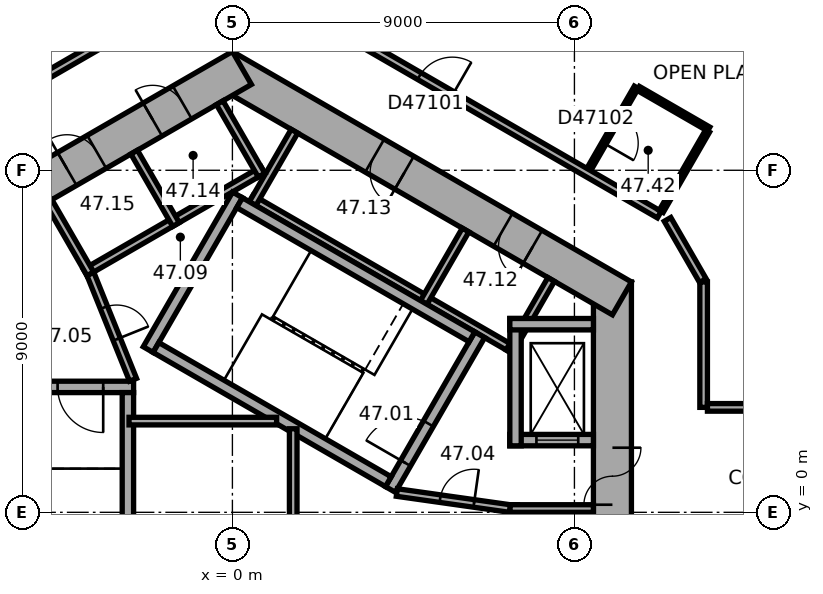
"""IFC4 building model, lengths in metres.
Left out: names, types, materials, properties, quantities, classifications, styles, units other than length and angle.
Written with IfcOpenShell. Run it as: python <this file> out.ifc"""

import sys

from ifc_helpers import new_model, si_unit, direction, frame, frame_2d, origin, place, context, subcontext, project, spatial, rectangle, extrude, element, fill, save


model = new_model("IFC4")
c1 = context("Model", 3, precision=1e-05, world=origin(), true_north=direction((0.0, 1.0)))
c2 = subcontext(c1, "Body", "Model", "MODEL_VIEW")
j1 = project(units=[si_unit("LENGTHUNIT", "METRE"), si_unit("PLANEANGLEUNIT", "RADIAN")], contexts=[c1])
p1 = place(None, origin())
s1 = spatial("IfcSite", under=j1, at=p1, CompositionType="ELEMENT")
p2 = place(p1, origin())
s2 = spatial("IfcBuilding", under=s1, at=p2, CompositionType="ELEMENT")
p3 = place(p2, frame((0.0, 0.0, 191.0)))
s3 = spatial("IfcBuildingStorey", under=s2, at=p3, CompositionType="ELEMENT", Elevation=191.0)
p4 = place(p3, frame((10.0, -6.062, 0.0), z_axis=(0.0, 0.0, 1.0), x_axis=(0.0, 1.0, 0.0)))
e1 = element("IfcWall", 1, at=p4, inside=s3, PredefinedType="SHEAR", context=c2, shape_type="SweptSolid", body=[
    extrude(rectangle(XDim=12.125, YDim=1.0, at=frame_2d((6.062, 0.0))), origin(), (0.0, 0.0, 1.0), 3.7),
])
p5 = place(p4, frame((6.262, 0.0, 0.0)))
e2 = element("IfcOpeningElement", 2, at=p5, cuts=e1, PredefinedType="OPENING", context=c2, shape_type="SweptSolid", body=[
    extrude(rectangle(XDim=1.5, YDim=2.1, at=frame_2d((0.75, 1.05))), frame((0.0, 0.51, 0.0), z_axis=(0.0, -1.0, 0.0), x_axis=(1.0, 0.0, 0.0)), (0.0, 0.0, 1.0), 1.02),
])
p6 = place(p4, frame((1.812, 0.0, 0.0)))
e3 = element("IfcOpeningElement", 3, at=p6, cuts=e1, PredefinedType="OPENING", context=c2, shape_type="SweptSolid", body=[
    extrude(rectangle(XDim=0.9, YDim=2.1, at=frame_2d((0.45, 1.05))), frame((0.0, 0.51, 0.0), z_axis=(0.0, -1.0, 0.0), x_axis=(1.0, 0.0, 0.0)), (0.0, 0.0, 1.0), 1.02),
])
p7 = place(p4, frame((4.412, 0.0, 0.0)))
e4 = element("IfcOpeningElement", 4, at=p7, cuts=e1, PredefinedType="OPENING", context=c2, shape_type="SweptSolid", body=[
    extrude(rectangle(XDim=0.9, YDim=2.1, at=frame_2d((0.45, 1.05))), frame((0.0, 0.51, 0.0), z_axis=(0.0, -1.0, 0.0), x_axis=(1.0, 0.0, 0.0)), (0.0, 0.0, 1.0), 1.02),
])
p8 = place(p3, frame((10.25, 5.629, 0.0), z_axis=(0.0, 0.0, 1.0), x_axis=(-0.866022616891, 0.50000482701, 0.0)))
e5 = element("IfcWall", 5, at=p8, inside=s3, PredefinedType="SHEAR", context=c2, shape_type="SweptSolid", body=[
    extrude(rectangle(XDim=12.125, YDim=1.0, at=frame_2d((6.062, 0.0))), origin(), (0.0, 0.0, 1.0), 3.7),
])
p9 = place(p8, frame((2.712, 0.0, 0.0)))
e6 = element("IfcOpeningElement", 6, at=p9, cuts=e5, PredefinedType="OPENING", context=c2, shape_type="SweptSolid", body=[
    extrude(rectangle(XDim=0.9, YDim=2.1, at=frame_2d((0.45, 1.05))), frame((0.0, 0.51, 0.0), z_axis=(0.0, -1.0, 0.0), x_axis=(1.0, 0.0, 0.0)), (0.0, 0.0, 1.0), 1.02),
])
p10 = place(p8, frame((6.612, 0.0, 0.0)))
e7 = element("IfcOpeningElement", 7, at=p10, cuts=e5, PredefinedType="OPENING", context=c2, shape_type="SweptSolid", body=[
    extrude(rectangle(XDim=0.9, YDim=2.1, at=frame_2d((0.45, 1.05))), frame((0.0, 0.51, 0.0), z_axis=(0.0, -1.0, 0.0), x_axis=(1.0, 0.0, 0.0)), (0.0, 0.0, 1.0), 1.02),
])
p11 = place(p3, frame((0.25, 11.691, 0.0), z_axis=(0.0, 0.0, 1.0), x_axis=(-0.866022616891, -0.50000482701, 0.0)))
e8 = element("IfcWall", 8, at=p11, inside=s3, PredefinedType="SHEAR", context=c2, shape_type="SweptSolid", body=[
    extrude(rectangle(XDim=12.125, YDim=1.0, at=frame_2d((6.062, 0.0))), origin(), (0.0, 0.0, 1.0), 3.7),
])
p12 = place(p11, frame((6.262, 0.0, 0.0)))
e9 = element("IfcOpeningElement", 9, at=p12, cuts=e8, PredefinedType="OPENING", context=c2, shape_type="SweptSolid", body=[
    extrude(rectangle(XDim=1.5, YDim=2.1, at=frame_2d((0.75, 1.05))), frame((0.0, 0.51, 0.0), z_axis=(0.0, -1.0, 0.0), x_axis=(1.0, 0.0, 0.0)), (0.0, 0.0, 1.0), 1.02),
])
p13 = place(p11, frame((1.812, 0.0, 0.0)))
e10 = element("IfcOpeningElement", 10, at=p13, cuts=e8, PredefinedType="OPENING", context=c2, shape_type="SweptSolid", body=[
    extrude(rectangle(XDim=0.9, YDim=2.1, at=frame_2d((0.45, 1.05))), frame((0.0, 0.51, 0.0), z_axis=(0.0, -1.0, 0.0), x_axis=(1.0, 0.0, 0.0)), (0.0, 0.0, 1.0), 1.02),
])
p14 = place(p11, frame((4.412, 0.0, 0.0)))
e11 = element("IfcOpeningElement", 11, at=p14, cuts=e8, PredefinedType="OPENING", context=c2, shape_type="SweptSolid", body=[
    extrude(rectangle(XDim=0.9, YDim=2.1, at=frame_2d((0.45, 1.05))), frame((0.0, 0.51, 0.0), z_axis=(0.0, -1.0, 0.0), x_axis=(1.0, 0.0, 0.0)), (0.0, 0.0, 1.0), 1.02),
])
p15 = place(p3, frame((7.4, -5.2, 0.0), z_axis=(0.0, 0.0, 1.0), x_axis=(0.0, 1.0, 0.0)))
e12 = element("IfcWall", 12, at=p15, inside=s3, PredefinedType="PARTITIONING", context=c2, shape_type="SweptSolid", body=[
    extrude(rectangle(XDim=5.4, YDim=0.2, at=frame_2d((2.7, 0.0))), origin(), (0.0, 0.0, 1.0), 3.42),
])
p16 = place(p3, frame((7.3, 0.1, 0.0), z_axis=(0.0, 0.0, 1.0), x_axis=(1.0, 0.0, 0.0)))
e13 = element("IfcWall", 13, at=p16, inside=s3, PredefinedType="PARTITIONING", context=c2, shape_type="SweptSolid", body=[
    extrude(rectangle(XDim=2.2, YDim=0.2, at=frame_2d((1.1, 0.0))), origin(), (0.0, 0.0, 1.0), 3.42),
])
p17 = place(p3, frame((7.424, 4.259, 0.0), z_axis=(0.0, 0.0, 1.0), x_axis=(-0.866026010844, 0.49999894854, 0.0)))
e14 = element("IfcWall", 14, at=p17, inside=s3, PredefinedType="PARTITIONING", context=c2, shape_type="SweptSolid", body=[
    extrude(rectangle(XDim=8.0, YDim=0.2, at=frame_2d((4.0, 0.0))), origin(), (0.0, 0.0, 1.0), 3.42),
])
for number, where, z_axis, x_axis in (
    (15, (7.287, 4.222, 0.0), (0.0, 0.0, 1.0), (0.5, 0.866, 0.0)),
    (16, (5.036, 5.522, 0.0), (0.0, 0.0, 1.0), (0.5, 0.866, 0.0)),
    (17, (0.532, 8.122, 0.0), (0.0, 0.0, 1.0), (0.5, 0.866, 0.0)),
):
    element("IfcWall", number, at=place(p3, frame(where, z_axis=z_axis, x_axis=x_axis)), inside=s3, PredefinedType="PARTITIONING", context=c2, shape_type="SweptSolid", body=[
        extrude(rectangle(XDim=2.2, YDim=0.2, at=frame_2d((1.1, 0.0))), origin(), (0.0, 0.0, 1.0), 3.42),
    ])
p18 = place(p3, frame((0.803, 9.009, 0.0), z_axis=(0.0, 0.0, 1.0), x_axis=(-0.866028230842, -0.499995103361, 0.0)))
e18 = element("IfcWall", 18, at=p18, inside=s3, PredefinedType="PARTITIONING", context=c2, shape_type="SweptSolid", body=[
    extrude(rectangle(XDim=5.4, YDim=0.2, at=frame_2d((2.7, 0.0))), origin(), (0.0, 0.0, 1.0), 3.42),
])
p19 = place(p3, frame((0.767, 8.872, 0.0), z_axis=(0.0, 0.0, 1.0), x_axis=(-0.499994660107, 0.866028486751, 0.0)))
e19 = element("IfcWall", 19, at=p19, inside=s3, PredefinedType="PARTITIONING", context=c2, shape_type="SweptSolid", body=[
    extrude(rectangle(XDim=2.2, YDim=0.2, at=frame_2d((1.1, 0.0))), origin(), (0.0, 0.0, 1.0), 3.42),
])
for number, where, z_axis, x_axis in (
    (20, (-1.485, 7.572, 0.0), (0.0, 0.0, 1.0), (-0.5, 0.866, 0.0)),
    (21, (-3.737, 6.272, 0.0), (0.0, 0.0, 1.0), (-0.5, 0.866, 0.0)),
):
    element("IfcWall", number, at=place(p3, frame(where, z_axis=z_axis, x_axis=x_axis)), inside=s3, PredefinedType="PARTITIONING", context=c2, shape_type="SweptSolid", body=[
        extrude(rectangle(XDim=2.2, YDim=0.2, at=frame_2d((1.1, 0.0))), origin(), (0.0, 0.0, 1.0), 3.42),
    ])
p20 = place(p3, frame((4.158, 0.602, 0.0), z_axis=(0.0, 0.0, 1.0), x_axis=(0.499977259774, 0.866038532462, 0.0)))
e22 = element("IfcWall", 22, at=p20, inside=s3, PredefinedType="SHEAR", context=c2, shape_type="SweptSolid", body=[
    extrude(rectangle(XDim=4.7, YDim=0.3, at=frame_2d((2.35, 0.0))), origin(), (0.0, 0.0, 1.0), 3.42),
])
p21 = place(p20, frame((0.8, 0.0, 0.0)))
e23 = element("IfcOpeningElement", 23, at=p21, cuts=e22, PredefinedType="OPENING", context=c2, shape_type="SweptSolid", body=[
    extrude(rectangle(XDim=1.2, YDim=2.1, at=frame_2d((0.6, 1.05))), frame((0.0, 0.16, 0.0), z_axis=(0.0, -1.0, 0.0), x_axis=(1.0, 0.0, 0.0)), (0.0, 0.0, 1.0), 0.32),
])
p22 = place(p3, frame((-2.216, 4.282, 0.0), z_axis=(0.0, 0.0, 1.0), x_axis=(0.499977259774, 0.866038532462, 0.0)))
e24 = element("IfcWall", 24, at=p22, inside=s3, PredefinedType="SHEAR", context=c2, shape_type="SweptSolid", body=[
    extrude(rectangle(XDim=4.7, YDim=0.3, at=frame_2d((2.35, 0.0))), origin(), (0.0, 0.0, 1.0), 3.42),
])
for number, where, z_axis, x_axis in (
    (25, (4.103, 0.807, 0.0), (0.0, 0.0, 1.0), (-0.866, 0.5, 0.0)),
    (26, (6.303, 4.617, 0.0), (0.0, 0.0, 1.0), (-0.866, 0.5, 0.0)),
):
    element("IfcWall", number, at=place(p3, frame(where, z_axis=z_axis, x_axis=x_axis)), inside=s3, PredefinedType="SHEAR", context=c2, shape_type="SweptSolid", body=[
        extrude(rectangle(XDim=7.06, YDim=0.3, at=frame_2d((3.53, 0.0))), origin(), (0.0, 0.0, 1.0), 3.42),
    ])
p23 = place(p3, frame((-2.6, 3.3, 0.0), z_axis=(0.0, 0.0, 1.0), x_axis=(-1.0, 0.0, 0.0)))
e27 = element("IfcWall", 27, at=p23, inside=s3, PredefinedType="SHEAR", context=c2, shape_type="SweptSolid", body=[
    extrude(rectangle(XDim=4.7, YDim=0.3, at=frame_2d((2.35, 0.0))), origin(), (0.0, 0.0, 1.0), 3.42),
])
p24 = place(p23, frame((0.8, 0.0, 0.0)))
e28 = element("IfcOpeningElement", 28, at=p24, cuts=e27, PredefinedType="OPENING", context=c2, shape_type="SweptSolid", body=[
    extrude(rectangle(XDim=1.2, YDim=2.1, at=frame_2d((0.6, 1.05))), frame((0.0, 0.16, 0.0), z_axis=(0.0, -1.0, 0.0), x_axis=(1.0, 0.0, 0.0)), (0.0, 0.0, 1.0), 0.32),
])
p25 = place(p3, frame((-2.75, 3.15, 0.0), z_axis=(0.0, 0.0, 1.0), x_axis=(0.0, -1.0, 0.0)))
e29 = element("IfcWall", 29, at=p25, inside=s3, PredefinedType="SHEAR", context=c2, shape_type="SweptSolid", body=[
    extrude(rectangle(XDim=7.06, YDim=0.3, at=frame_2d((3.53, 0.0))), origin(), (0.0, 0.0, 1.0), 3.42),
])
p26 = place(p3, frame((7.3, 1.9, 0.0), z_axis=(0.0, 0.0, 1.0), x_axis=(1.0, 0.0, 0.0)))
e30 = element("IfcWall", 30, at=p26, inside=s3, PredefinedType="SHEAR", context=c2, shape_type="SweptSolid", body=[
    extrude(rectangle(XDim=2.2, YDim=0.3, at=frame_2d((1.1, 0.0))), origin(), (0.0, 0.0, 1.0), 3.42),
])
p27 = place(p26, frame((0.7, 0.0, 0.0)))
e31 = element("IfcOpeningElement", 31, at=p27, cuts=e30, PredefinedType="OPENING", context=c2, shape_type="SweptSolid", body=[
    extrude(rectangle(XDim=1.1, YDim=2.1, at=frame_2d((0.55, 1.05))), frame((0.0, 0.16, 0.0), z_axis=(0.0, -1.0, 0.0), x_axis=(1.0, 0.0, 0.0)), (0.0, 0.0, 1.0), 0.32),
])
p28 = place(p3, frame((7.45, 1.75, 0.0), z_axis=(0.0, 0.0, 1.0), x_axis=(0.0, 1.0, 0.0)))
e32 = element("IfcWall", 32, at=p28, inside=s3, PredefinedType="SHEAR", context=c2, shape_type="SweptSolid", body=[
    extrude(rectangle(XDim=3.35, YDim=0.3, at=frame_2d((1.675, 0.0))), origin(), (0.0, 0.0, 1.0), 3.42),
])
p29 = place(p3, frame((7.3, 4.95, 0.0), z_axis=(0.0, 0.0, 1.0), x_axis=(1.0, 0.0, 0.0)))
e33 = element("IfcWall", 33, at=p29, inside=s3, PredefinedType="SHEAR", context=c2, shape_type="SweptSolid", body=[
    extrude(rectangle(XDim=2.2, YDim=0.3, at=frame_2d((1.1, 0.0))), origin(), (0.0, 0.0, 1.0), 3.42),
])
p30 = place(p3, frame((4.327, 0.521, 0.0), z_axis=(0.0, 0.0, 1.0), x_axis=(0.990124376366, -0.14019172346, 0.0)))
e34 = element("IfcWall", 34, at=p30, inside=s3, PredefinedType="PARTITIONING", context=c2, shape_type="SweptSolid", body=[
    extrude(rectangle(XDim=3.002, YDim=0.2, at=frame_2d((1.501, 0.0))), origin(), (0.0, 0.0, 1.0), 3.42),
])
p31 = place(p30, frame((1.15, 0.0, 0.0)))
e35 = element("IfcOpeningElement", 35, at=p31, cuts=e34, PredefinedType="OPENING", context=c2, shape_type="SweptSolid", body=[
    extrude(rectangle(XDim=0.9, YDim=2.1, at=frame_2d((0.45, 1.05))), frame((0.0, 0.11, 0.0), z_axis=(0.0, -1.0, 0.0), x_axis=(1.0, 0.0, 0.0)), (0.0, 0.0, 1.0), 0.22),
])
p32 = place(p3, frame((-2.615, 3.487, 0.0), z_axis=(0.0, 0.0, 1.0), x_axis=(-0.373576831041, 0.92759924068, 0.0)))
e36 = element("IfcWall", 36, at=p32, inside=s3, PredefinedType="PARTITIONING", context=c2, shape_type="SweptSolid", body=[
    extrude(rectangle(XDim=3.002, YDim=0.2, at=frame_2d((1.501, 0.0))), origin(), (0.0, 0.0, 1.0), 3.42),
])
p33 = place(p32, frame((1.15, 0.0, 0.0)))
e37 = element("IfcOpeningElement", 37, at=p33, cuts=e36, PredefinedType="OPENING", context=c2, shape_type="SweptSolid", body=[
    extrude(rectangle(XDim=0.9, YDim=2.1, at=frame_2d((0.45, 1.05))), frame((0.0, 0.11, 0.0), z_axis=(0.0, -1.0, 0.0), x_axis=(1.0, 0.0, 0.0)), (0.0, 0.0, 1.0), 0.22),
])
p34 = place(p3, frame((-2.72, 2.4, 0.0), z_axis=(0.0, 0.0, 1.0), x_axis=(1.0, 0.0, 0.0)))
e38 = element("IfcWall", 38, at=p34, inside=s3, PredefinedType="PARTITIONING", context=c2, shape_type="SweptSolid", body=[
    extrude(rectangle(XDim=3.883, YDim=0.2, at=frame_2d((1.941, 0.0))), origin(), (0.0, 0.0, 1.0), 3.42),
])
p35 = place(p3, frame((1.6, -2.198, 0.0), z_axis=(0.0, 0.0, 1.0), x_axis=(0.0, 1.0, 0.0)))
e39 = element("IfcWall", 39, at=p35, inside=s3, PredefinedType="PARTITIONING", context=c2, shape_type="SweptSolid", body=[
    extrude(rectangle(XDim=4.397, YDim=0.2, at=frame_2d((2.198, 0.0))), origin(), (0.0, 0.0, 1.0), 3.42),
])
p36 = place(p3, frame((-0.95, 13.77, 0.0), z_axis=(0.0, 0.0, 1.0), x_axis=(-0.866036689987, -0.499980451214, 0.0)))
e40 = element("IfcWall", 40, at=p36, inside=s3, PredefinedType="PARTITIONING", context=c2, shape_type="SweptSolid", body=[
    extrude(rectangle(XDim=4.969, YDim=0.2, at=frame_2d((2.485, 0.0))), origin(), (0.0, 0.0, 1.0), 3.42),
])
p37 = place(p3, frame((9.378, 9.019, 0.0), z_axis=(0.0, 0.0, 1.0), x_axis=(0.500004234368, 0.866022959057, 0.0)))
e41 = element("IfcWall", 41, at=p37, inside=s3, PredefinedType="PARTITIONING", context=c2, shape_type="SweptSolid", body=[
    extrude(rectangle(XDim=2.5, YDim=0.12, at=frame_2d((1.25, 0.0))), origin(), (0.0, 0.0, 1.0), 3.42),
])
p38 = place(p37, frame((0.8, 0.0, 0.0)))
e42 = element("IfcOpeningElement", 42, at=p38, cuts=e41, PredefinedType="OPENING", context=c2, shape_type="SweptSolid", body=[
    extrude(rectangle(XDim=0.9, YDim=2.1, at=frame_2d((0.45, 1.05))), frame((0.0, 0.07, 0.0), z_axis=(0.0, -1.0, 0.0), x_axis=(1.0, 0.0, 0.0)), (0.0, 0.0, 1.0), 0.14),
])
p39 = place(p3, frame((10.68, 11.154, 0.0), z_axis=(0.0, 0.0, 1.0), x_axis=(0.86600889856, -0.500028586798, 0.0)))
e43 = element("IfcWall", 43, at=p39, inside=s3, PredefinedType="PARTITIONING", context=c2, shape_type="SweptSolid", body=[
    extrude(rectangle(XDim=2.14, YDim=0.12, at=frame_2d((1.07, 0.0))), origin(), (0.0, 0.0, 1.0), 3.42),
])
p40 = place(p3, frame((11.233, 7.833, 0.0), z_axis=(0.0, 0.0, 1.0), x_axis=(-0.866021713988, 0.50000639086, 0.0)))
e44 = element("IfcWall", 44, at=p40, inside=s3, PredefinedType="PARTITIONING", context=c2, shape_type="SweptSolid", body=[
    extrude(rectangle(XDim=11.834, YDim=0.2, at=frame_2d((5.917, 0.0))), origin(), (0.0, 0.0, 1.0), 3.42),
])
p41 = place(p40, frame((6.288, 0.0, 0.0)))
e45 = element("IfcOpeningElement", 45, at=p41, cuts=e44, PredefinedType="OPENING", context=c2, shape_type="SweptSolid", body=[
    extrude(rectangle(XDim=1.0, YDim=2.1, at=frame_2d((0.5, 1.05))), frame((0.0, 0.11, 0.0), z_axis=(0.0, -1.0, 0.0), x_axis=(1.0, 0.0, 0.0)), (0.0, 0.0, 1.0), 0.22),
])
p42 = place(p3, frame((12.38, 6.097, 0.0), z_axis=(0.0, 0.0, 1.0), x_axis=(-0.499964847546, 0.866045698112, 0.0)))
e46 = element("IfcWall", 46, at=p42, inside=s3, PredefinedType="PARTITIONING", context=c2, shape_type="SweptSolid", body=[
    extrude(rectangle(XDim=1.86, YDim=0.2, at=frame_2d((0.93, 0.0))), origin(), (0.0, 0.0, 1.0), 3.42),
])
p43 = place(p3, frame((12.4, 2.761, 0.0), z_axis=(0.0, 0.0, 1.0), x_axis=(0.0, 1.0, 0.0)))
e47 = element("IfcWall", 47, at=p43, inside=s3, PredefinedType="PARTITIONING", context=c2, shape_type="SweptSolid", body=[
    extrude(rectangle(XDim=3.301, YDim=0.2, at=frame_2d((1.65, 0.0))), origin(), (0.0, 0.0, 1.0), 3.42),
])
p44 = place(p3, frame((12.503, 10.032, 0.0), z_axis=(0.0, 0.0, 1.0), x_axis=(-0.500002508028, -0.866023955769, 0.0)))
e48 = element("IfcWall", 48, at=p44, inside=s3, PredefinedType="PARTITIONING", context=c2, shape_type="SweptSolid", body=[
    extrude(rectangle(XDim=2.44, YDim=0.12, at=frame_2d((1.22, 0.0))), origin(), (0.0, 0.0, 1.0), 3.42),
])
p45 = place(p3, frame((20.75, 2.761, 0.0), z_axis=(0.0, 0.0, 1.0), x_axis=(-1.0, 0.0, 0.0)))
e49 = element("IfcWall", 49, at=p45, inside=s3, PredefinedType="PARTITIONING", context=c2, shape_type="SweptSolid", body=[
    extrude(rectangle(XDim=8.25, YDim=0.2, at=frame_2d((4.125, 0.0))), origin(), (0.0, 0.0, 1.0), 3.42),
])
p46 = place(p5, origin())
e50 = element("IfcDoor", 50, at=p46, inside=s3, OperationType="DOUBLE_DOOR_SINGLE_SWING", PredefinedType="DOOR", context=c2, shape_type="SweptSolid", body=[
    extrude(rectangle(XDim=1.5, YDim=2.1, at=frame_2d((0.75, 1.05))), frame((0.0, 0.025, 0.0), z_axis=(0.0, -1.0, 0.0), x_axis=(1.0, 0.0, 0.0)), (0.0, 0.0, 1.0), 0.05),
])
fill(e2, e50)
p47 = place(p21, origin())
e51 = element("IfcDoor", 51, at=p47, inside=s3, OperationType="SINGLE_SWING_RIGHT", PredefinedType="DOOR", context=c2, shape_type="SweptSolid", body=[
    extrude(rectangle(XDim=1.2, YDim=2.1, at=frame_2d((0.6, 1.05))), frame((0.0, 0.025, 0.0), z_axis=(0.0, -1.0, 0.0), x_axis=(1.0, 0.0, 0.0)), (0.0, 0.0, 1.0), 0.05),
])
fill(e23, e51)
p48 = place(p24, origin())
e52 = element("IfcDoor", 52, at=p48, inside=s3, OperationType="SINGLE_SWING_RIGHT", PredefinedType="DOOR", context=c2, shape_type="SweptSolid", body=[
    extrude(rectangle(XDim=1.2, YDim=2.1, at=frame_2d((0.6, 1.05))), frame((0.0, 0.025, 0.0), z_axis=(0.0, -1.0, 0.0), x_axis=(1.0, 0.0, 0.0)), (0.0, 0.0, 1.0), 0.05),
])
fill(e28, e52)
p49 = place(p31, origin())
e53 = element("IfcDoor", 53, at=p49, inside=s3, OperationType="SINGLE_SWING_LEFT", PredefinedType="DOOR", context=c2, shape_type="SweptSolid", body=[
    extrude(rectangle(XDim=0.9, YDim=2.1, at=frame_2d((0.45, 1.05))), frame((0.0, 0.025, 0.0), z_axis=(0.0, -1.0, 0.0), x_axis=(1.0, 0.0, 0.0)), (0.0, 0.0, 1.0), 0.05),
])
fill(e35, e53)
p50 = place(p33, origin())
e54 = element("IfcDoor", 54, at=p50, inside=s3, OperationType="SINGLE_SWING_LEFT", PredefinedType="DOOR", context=c2, shape_type="SweptSolid", body=[
    extrude(rectangle(XDim=0.9, YDim=2.1, at=frame_2d((0.45, 1.05))), frame((0.0, 0.025, 0.0), z_axis=(0.0, -1.0, 0.0), x_axis=(1.0, 0.0, 0.0)), (0.0, 0.0, 1.0), 0.05),
])
fill(e37, e54)
p51 = place(p9, origin())
e55 = element("IfcDoor", 55, at=p51, inside=s3, OperationType="SINGLE_SWING_LEFT", PredefinedType="DOOR", context=c2, shape_type="SweptSolid", body=[
    extrude(rectangle(XDim=0.9, YDim=2.1, at=frame_2d((0.45, 1.05))), frame((0.0, 0.025, 0.0), z_axis=(0.0, -1.0, 0.0), x_axis=(1.0, 0.0, 0.0)), (0.0, 0.0, 1.0), 0.05),
])
fill(e6, e55)
p52 = place(p10, origin())
e56 = element("IfcDoor", 56, at=p52, inside=s3, OperationType="SINGLE_SWING_LEFT", PredefinedType="DOOR", context=c2, shape_type="SweptSolid", body=[
    extrude(rectangle(XDim=0.9, YDim=2.1, at=frame_2d((0.45, 1.05))), frame((0.0, 0.025, 0.0), z_axis=(0.0, -1.0, 0.0), x_axis=(1.0, 0.0, 0.0)), (0.0, 0.0, 1.0), 0.05),
])
fill(e7, e56)
p53 = place(p13, origin())
e57 = element("IfcDoor", 57, at=p53, inside=s3, OperationType="SINGLE_SWING_LEFT", PredefinedType="DOOR", context=c2, shape_type="SweptSolid", body=[
    extrude(rectangle(XDim=0.9, YDim=2.1, at=frame_2d((0.45, 1.05))), frame((0.0, 0.025, 0.0), z_axis=(0.0, -1.0, 0.0), x_axis=(1.0, 0.0, 0.0)), (0.0, 0.0, 1.0), 0.05),
])
fill(e10, e57)
p54 = place(p14, origin())
e58 = element("IfcDoor", 58, at=p54, inside=s3, OperationType="SINGLE_SWING_LEFT", PredefinedType="DOOR", context=c2, shape_type="SweptSolid", body=[
    extrude(rectangle(XDim=0.9, YDim=2.1, at=frame_2d((0.45, 1.05))), frame((0.0, 0.025, 0.0), z_axis=(0.0, -1.0, 0.0), x_axis=(1.0, 0.0, 0.0)), (0.0, 0.0, 1.0), 0.05),
])
fill(e11, e58)
p55 = place(p27, origin())
e59 = element("IfcDoor", 59, at=p55, inside=s3, OperationType="DOUBLE_DOOR_SLIDING", PredefinedType="DOOR", context=c2, shape_type="SweptSolid", body=[
    extrude(rectangle(XDim=1.1, YDim=2.1, at=frame_2d((0.55, 1.05))), frame((0.0, 0.025, 0.0), z_axis=(0.0, -1.0, 0.0), x_axis=(1.0, 0.0, 0.0)), (0.0, 0.0, 1.0), 0.05),
])
fill(e31, e59)
p56 = place(p41, origin())
e60 = element("IfcDoor", 60, at=p56, inside=s3, OperationType="SINGLE_SWING_LEFT", PredefinedType="DOOR", context=c2, shape_type="SweptSolid", body=[
    extrude(rectangle(XDim=1.0, YDim=2.1, at=frame_2d((0.5, 1.05))), frame((0.0, 0.025, 0.0), z_axis=(0.0, -1.0, 0.0), x_axis=(1.0, 0.0, 0.0)), (0.0, 0.0, 1.0), 0.05),
])
fill(e45, e60)
p57 = place(p38, origin())
e61 = element("IfcDoor", 61, at=p57, inside=s3, OperationType="SINGLE_SWING_LEFT", PredefinedType="DOOR", context=c2, shape_type="SweptSolid", body=[
    extrude(rectangle(XDim=0.9, YDim=2.1, at=frame_2d((0.45, 1.05))), frame((0.0, 0.025, 0.0), z_axis=(0.0, -1.0, 0.0), x_axis=(1.0, 0.0, 0.0)), (0.0, 0.0, 1.0), 0.05),
])
fill(e42, e61)
save(model, sys.argv[1])
